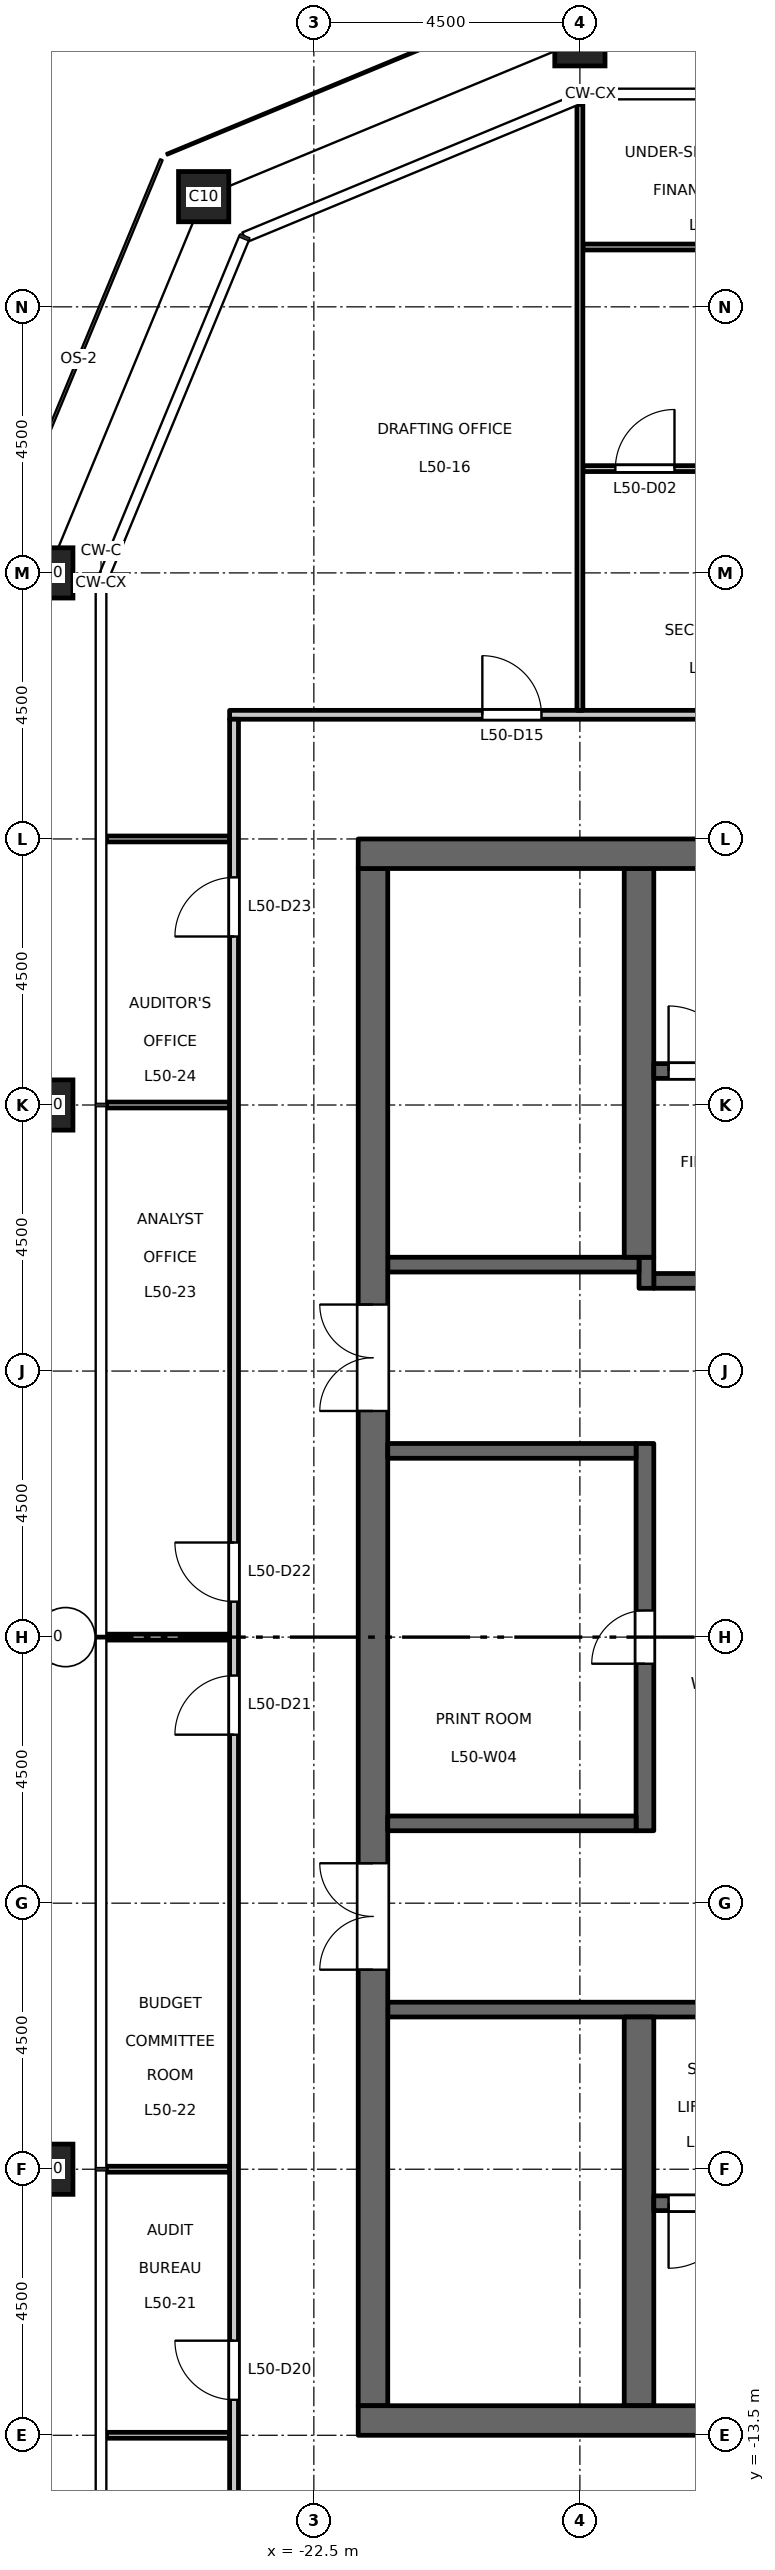
"""IFC4 building model, lengths in metres.
Left out: names, types, materials, properties, quantities, classifications, styles, units other than length and angle.
Written with IfcOpenShell. Run it as: python <this file> out.ifc"""

import sys

from ifc_helpers import new_model, si_unit, direction, frame, frame_2d, origin, origin_2d, place, context, subcontext, project, spatial, rectangle, hollow_rectangle, extrude, element, fill, save


model = new_model("IFC4")
c1 = context("Model", 3, precision=1e-05, world=origin(), true_north=direction((0.0, 1.0)))
c2 = subcontext(c1, "Body", "Model", "MODEL_VIEW")
j1 = project(units=[si_unit("LENGTHUNIT", "METRE"), si_unit("PLANEANGLEUNIT", "RADIAN")], contexts=[c1])
p1 = place(None, origin())
s1 = spatial("IfcSite", under=j1, at=p1, CompositionType="ELEMENT")
p2 = place(p1, origin())
s2 = spatial("IfcBuilding", under=s1, at=p2, CompositionType="ELEMENT")
p3 = place(p2, frame((0.0, 0.0, 233.2)))
s3 = spatial("IfcBuildingStorey", under=s2, at=p3, CompositionType="ELEMENT", Elevation=233.2)
for number, where, z_axis, x_axis in (
    (1, (-18.0, 27.0, 0.0), (0.0, 0.0, 1.0), (1.0, 0.0, 0.0)),
    (2, (-24.364, 24.364, 0.0), (0.0, 0.0, 1.0), (1.0, 0.0, 0.0)),
    (3, (-27.0, 18.0, 0.0), (0.0, 0.0, 1.0), (1.0, 0.0, 0.0)),
    (4, (-27.0, 9.0, 0.0), (0.0, 0.0, 1.0), (1.0, 0.0, 0.0)),
    (5, (-27.0, 0.0, 0.0), (0.0, 0.0, 1.0), (1.0, 0.0, 0.0)),
    (6, (-27.0, -9.0, 0.0), (0.0, 0.0, 1.0), (1.0, 0.0, 0.0)),
):
    element("IfcColumn", number, at=place(p3, frame(where, z_axis=z_axis, x_axis=x_axis)), inside=s3, PredefinedType="COLUMN", context=c2, shape_type="SweptSolid", body=[
        extrude(hollow_rectangle(XDim=0.85, YDim=0.85, WallThickness=0.05, at=origin_2d()), origin(), (0.0, 0.0, 1.0), 4.5),
    ])
p4 = place(p3, frame((-12.15, 6.025, 0.0), z_axis=(0.0, 0.0, 1.0), x_axis=(-1.0, 0.0, 0.0)))
e7 = element("IfcWall", 7, at=p4, inside=s3, PredefinedType="SHEAR", context=c2, shape_type="SweptSolid", body=[
    extrude(rectangle(XDim=4.6, YDim=0.25, at=frame_2d((2.3, 0.0))), origin(), (0.0, 0.0, 1.0), 4.35),
])
p5 = place(p4, frame((1.8, 0.0, 0.0)))
e8 = element("IfcOpeningElement", 8, at=p5, cuts=e7, PredefinedType="OPENING", context=c2, shape_type="SweptSolid", body=[
    extrude(rectangle(XDim=1.0, YDim=2.1, at=frame_2d((0.5, 1.05))), frame((0.0, 0.135, 0.0), z_axis=(0.0, -1.0, 0.0), x_axis=(1.0, 0.0, 0.0)), (0.0, 0.0, 1.0), 0.27),
])
p6 = place(p3, frame((-16.875, 5.9, 0.0), z_axis=(0.0, 0.0, 1.0), x_axis=(0.0, 1.0, 0.0)))
e9 = element("IfcWall", 9, at=p6, inside=s3, PredefinedType="SHEAR", context=c2, shape_type="SweptSolid", body=[
    extrude(rectangle(XDim=0.525, YDim=0.25, at=frame_2d((0.263, 0.0))), origin(), (0.0, 0.0, 1.0), 4.35),
])
p7 = place(p3, frame((-17.0, 6.3, 0.0), z_axis=(0.0, 0.0, 1.0), x_axis=(-1.0, 0.0, 0.0)))
e10 = element("IfcWall", 10, at=p7, inside=s3, PredefinedType="SHEAR", context=c2, shape_type="SweptSolid", body=[
    extrude(rectangle(XDim=4.25, YDim=0.25, at=frame_2d((2.125, 0.0))), origin(), (0.0, 0.0, 1.0), 4.35),
])
p8 = place(p3, frame((-12.15, -6.3, 0.0), z_axis=(0.0, 0.0, 1.0), x_axis=(-1.0, 0.0, 0.0)))
e11 = element("IfcWall", 11, at=p8, inside=s3, PredefinedType="SHEAR", context=c2, shape_type="SweptSolid", body=[
    extrude(rectangle(XDim=9.1, YDim=0.25, at=frame_2d((4.55, 0.0))), origin(), (0.0, 0.0, 1.0), 4.35),
])
p9 = place(p8, frame((1.8, 0.0, 0.0)))
e12 = element("IfcOpeningElement", 12, at=p9, cuts=e11, PredefinedType="OPENING", context=c2, shape_type="SweptSolid", body=[
    extrude(rectangle(XDim=1.0, YDim=2.1, at=frame_2d((0.5, 1.05))), frame((0.0, 0.135, 0.0), z_axis=(0.0, -1.0, 0.0), x_axis=(1.0, 0.0, 0.0)), (0.0, 0.0, 1.0), 0.27),
])
p10 = place(p3, frame((-21.5, -13.0, 0.0), z_axis=(0.0, 0.0, 1.0), x_axis=(0.0, 1.0, 0.0)))
e13 = element("IfcWall", 13, at=p10, inside=s3, PredefinedType="SHEAR", context=c2, shape_type="SweptSolid", body=[
    extrude(rectangle(XDim=26.0, YDim=0.5, at=frame_2d((13.0, 0.0))), origin(), (0.0, 0.0, 1.0), 4.35),
])
p11 = place(p10, frame((16.825, 0.0, 0.0)))
e14 = element("IfcOpeningElement", 14, at=p11, cuts=e13, PredefinedType="OPENING", context=c2, shape_type="SweptSolid", body=[
    extrude(rectangle(XDim=1.8, YDim=2.1, at=frame_2d((0.9, 1.05))), frame((0.0, 0.26, 0.0), z_axis=(0.0, -1.0, 0.0), x_axis=(1.0, 0.0, 0.0)), (0.0, 0.0, 1.0), 0.52),
])
p12 = place(p10, frame((7.375, 0.0, 0.0)))
e15 = element("IfcOpeningElement", 15, at=p12, cuts=e13, PredefinedType="OPENING", context=c2, shape_type="SweptSolid", body=[
    extrude(rectangle(XDim=1.8, YDim=2.1, at=frame_2d((0.9, 1.05))), frame((0.0, 0.26, 0.0), z_axis=(0.0, -1.0, 0.0), x_axis=(1.0, 0.0, 0.0)), (0.0, 0.0, 1.0), 0.52),
])
p13 = place(p3, frame((-16.9, -3.275, 0.0), z_axis=(0.0, 0.0, 1.0), x_axis=(0.0, 1.0, 0.0)))
e16 = element("IfcWall", 16, at=p13, inside=s3, PredefinedType="SHEAR", context=c2, shape_type="SweptSolid", body=[
    extrude(rectangle(XDim=6.55, YDim=0.3, at=frame_2d((3.275, 0.0))), origin(), (0.0, 0.0, 1.0), 4.35),
])
p14 = place(p13, frame((2.825, 0.0, 0.0)))
e17 = element("IfcOpeningElement", 17, at=p14, cuts=e16, PredefinedType="OPENING", context=c2, shape_type="SweptSolid", body=[
    extrude(rectangle(XDim=0.9, YDim=2.1, at=frame_2d((0.45, 1.05))), frame((0.0, 0.16, 0.0), z_axis=(0.0, -1.0, 0.0), x_axis=(1.0, 0.0, 0.0)), (0.0, 0.0, 1.0), 0.32),
])
for number, where, z_axis, x_axis in (
    (18, (-17.05, 3.15, 0.0), (0.0, 0.0, 1.0), (-1.0, 0.0, 0.0)),
    (19, (-17.05, -3.15, 0.0), (0.0, 0.0, 1.0), (-1.0, 0.0, 0.0)),
):
    element("IfcWall", number, at=place(p3, frame(where, z_axis=z_axis, x_axis=x_axis)), inside=s3, PredefinedType="SHEAR", context=c2, shape_type="SweptSolid", body=[
        extrude(rectangle(XDim=4.2, YDim=0.25, at=frame_2d((2.1, 0.0))), origin(), (0.0, 0.0, 1.0), 4.35),
    ])
for number, where, z_axis, x_axis in (
    (20, (-17.0, 6.425, 0.0), (0.0, 0.0, 1.0), (0.0, 1.0, 0.0)),
    (21, (-17.0, -13.0, 0.0), (0.0, 0.0, 1.0), (0.0, 1.0, 0.0)),
):
    element("IfcWall", number, at=place(p3, frame(where, z_axis=z_axis, x_axis=x_axis)), inside=s3, PredefinedType="SHEAR", context=c2, shape_type="SweptSolid", body=[
        extrude(rectangle(XDim=6.575, YDim=0.5, at=frame_2d((3.288, 0.0))), origin(), (0.0, 0.0, 1.0), 4.35),
    ])
p15 = place(p3, frame((-8.75, 9.575, 0.0), z_axis=(0.0, 0.0, 1.0), x_axis=(-1.0, 0.0, 0.0)))
e22 = element("IfcWall", 22, at=p15, inside=s3, PredefinedType="SHEAR", context=c2, shape_type="SweptSolid", body=[
    extrude(rectangle(XDim=8.0, YDim=0.25, at=frame_2d((4.0, 0.0))), origin(), (0.0, 0.0, 1.0), 4.35),
])
p16 = place(p15, frame((6.65, 0.0, 0.0)))
e23 = element("IfcOpeningElement", 23, at=p16, cuts=e22, PredefinedType="OPENING", context=c2, shape_type="SweptSolid", body=[
    extrude(rectangle(XDim=1.1, YDim=2.1, at=frame_2d((0.55, 1.05))), frame((0.0, 0.135, 0.0), z_axis=(0.0, -1.0, 0.0), x_axis=(1.0, 0.0, 0.0)), (0.0, 0.0, 1.0), 0.27),
])
p17 = place(p3, frame((-8.75, -9.575, 0.0), z_axis=(0.0, 0.0, 1.0), x_axis=(-1.0, 0.0, 0.0)))
e24 = element("IfcWall", 24, at=p17, inside=s3, PredefinedType="SHEAR", context=c2, shape_type="SweptSolid", body=[
    extrude(rectangle(XDim=8.0, YDim=0.25, at=frame_2d((4.0, 0.0))), origin(), (0.0, 0.0, 1.0), 4.35),
])
p18 = place(p17, frame((6.65, 0.0, 0.0)))
e25 = element("IfcOpeningElement", 25, at=p18, cuts=e24, PredefinedType="OPENING", context=c2, shape_type="SweptSolid", body=[
    extrude(rectangle(XDim=1.1, YDim=2.1, at=frame_2d((0.55, 1.05))), frame((0.0, 0.135, 0.0), z_axis=(0.0, -1.0, 0.0), x_axis=(1.0, 0.0, 0.0)), (0.0, 0.0, 1.0), 0.27),
])
for number, where, z_axis, x_axis in (
    (26, (-8.25, 13.25, 0.0), (0.0, 0.0, 1.0), (-1.0, 0.0, 0.0)),
    (27, (-8.25, -13.25, 0.0), (0.0, 0.0, 1.0), (-1.0, 0.0, 0.0)),
):
    element("IfcWall", number, at=place(p3, frame(where, z_axis=z_axis, x_axis=x_axis)), inside=s3, PredefinedType="SHEAR", context=c2, shape_type="SweptSolid", body=[
        extrude(rectangle(XDim=13.5, YDim=0.5, at=frame_2d((6.75, 0.0))), origin(), (0.0, 0.0, 1.0), 4.35),
    ])
p19 = place(p3, frame((-26.01, -13.5, 0.0), z_axis=(0.0, 0.0, 1.0), x_axis=(1.0, 0.0, 0.0)))
e28 = element("IfcWall", 28, at=p19, inside=s3, PredefinedType="PARTITIONING", context=c2, shape_type="SweptSolid", body=[
    extrude(rectangle(XDim=2.085, YDim=0.1, at=frame_2d((1.042, 0.0))), origin(), (0.0, 0.0, 1.0), 3.95),
])
for number, where, z_axis, x_axis in (
    (29, (-26.01, -9.0, 0.0), (0.0, 0.0, 1.0), (1.0, 0.0, 0.0)),
    (30, (-26.01, 0.0, 0.0), (0.0, 0.0, 1.0), (1.0, 0.0, 0.0)),
    (31, (-26.01, 9.0, 0.0), (0.0, 0.0, 1.0), (1.0, 0.0, 0.0)),
    (32, (-26.01, 13.5, 0.0), (0.0, 0.0, 1.0), (1.0, 0.0, 0.0)),
):
    element("IfcWall", number, at=place(p3, frame(where, z_axis=z_axis, x_axis=x_axis)), inside=s3, PredefinedType="PARTITIONING", context=c2, shape_type="SweptSolid", body=[
        extrude(rectangle(XDim=2.085, YDim=0.1, at=frame_2d((1.042, 0.0))), origin(), (0.0, 0.0, 1.0), 4.35),
    ])
p20 = place(p3, frame((-23.925, 15.6, 0.0), z_axis=(0.0, 0.0, 1.0), x_axis=(1.0, 0.0, 0.0)))
e33 = element("IfcWall", 33, at=p20, inside=s3, PredefinedType="PARTITIONING", context=c2, shape_type="SweptSolid", body=[
    extrude(rectangle(XDim=47.85, YDim=0.15, at=frame_2d((23.925, 0.0))), origin(), (0.0, 0.0, 1.0), 4.35),
])
p21 = place(p20, frame((13.275, 0.0, 0.0)))
e34 = element("IfcOpeningElement", 34, at=p21, cuts=e33, PredefinedType="OPENING", context=c2, shape_type="SweptSolid", body=[
    extrude(rectangle(XDim=1.0, YDim=2.1, at=frame_2d((0.5, 1.05))), frame((0.0, 0.085, 0.0), z_axis=(0.0, -1.0, 0.0), x_axis=(1.0, 0.0, 0.0)), (0.0, 0.0, 1.0), 0.17),
])
p22 = place(p20, frame((15.525, 0.0, 0.0)))
e35 = element("IfcOpeningElement", 35, at=p22, cuts=e33, PredefinedType="OPENING", context=c2, shape_type="SweptSolid", body=[
    extrude(rectangle(XDim=1.0, YDim=2.1, at=frame_2d((0.5, 1.05))), frame((0.0, 0.085, 0.0), z_axis=(0.0, -1.0, 0.0), x_axis=(1.0, 0.0, 0.0)), (0.0, 0.0, 1.0), 0.17),
])
p23 = place(p20, frame((31.275, 0.0, 0.0)))
e36 = element("IfcOpeningElement", 36, at=p23, cuts=e33, PredefinedType="OPENING", context=c2, shape_type="SweptSolid", body=[
    extrude(rectangle(XDim=1.0, YDim=2.1, at=frame_2d((0.5, 1.05))), frame((0.0, 0.085, 0.0), z_axis=(0.0, -1.0, 0.0), x_axis=(1.0, 0.0, 0.0)), (0.0, 0.0, 1.0), 0.17),
])
p24 = place(p20, frame((33.525, 0.0, 0.0)))
e37 = element("IfcOpeningElement", 37, at=p24, cuts=e33, PredefinedType="OPENING", context=c2, shape_type="SweptSolid", body=[
    extrude(rectangle(XDim=1.0, YDim=2.1, at=frame_2d((0.5, 1.05))), frame((0.0, 0.085, 0.0), z_axis=(0.0, -1.0, 0.0), x_axis=(1.0, 0.0, 0.0)), (0.0, 0.0, 1.0), 0.17),
])
p25 = place(p20, frame((4.275, 0.0, 0.0)))
e38 = element("IfcOpeningElement", 38, at=p25, cuts=e33, PredefinedType="OPENING", context=c2, shape_type="SweptSolid", body=[
    extrude(rectangle(XDim=1.0, YDim=2.1, at=frame_2d((0.5, 1.05))), frame((0.0, 0.085, 0.0), z_axis=(0.0, -1.0, 0.0), x_axis=(1.0, 0.0, 0.0)), (0.0, 0.0, 1.0), 0.17),
])
p26 = place(p20, frame((42.625, 0.0, 0.0)))
e39 = element("IfcOpeningElement", 39, at=p26, cuts=e33, PredefinedType="OPENING", context=c2, shape_type="SweptSolid", body=[
    extrude(rectangle(XDim=1.0, YDim=2.1, at=frame_2d((0.5, 1.05))), frame((0.0, 0.085, 0.0), z_axis=(0.0, -1.0, 0.0), x_axis=(1.0, 0.0, 0.0)), (0.0, 0.0, 1.0), 0.17),
])
p27 = place(p3, frame((-17.95, 19.764, 0.0), z_axis=(0.0, 0.0, 1.0), x_axis=(1.0, 0.0, 0.0)))
e40 = element("IfcWall", 40, at=p27, inside=s3, PredefinedType="PARTITIONING", context=c2, shape_type="SweptSolid", body=[
    extrude(rectangle(XDim=8.9, YDim=0.1, at=frame_2d((4.45, 0.0))), origin(), (0.0, 0.0, 1.0), 4.35),
])
p28 = place(p27, frame((0.55, 0.0, 0.0)))
e41 = element("IfcOpeningElement", 41, at=p28, cuts=e40, PredefinedType="OPENING", context=c2, shape_type="SweptSolid", body=[
    extrude(rectangle(XDim=1.0, YDim=2.1, at=frame_2d((0.5, 1.05))), frame((0.0, 0.06, 0.0), z_axis=(0.0, -1.0, 0.0), x_axis=(1.0, 0.0, 0.0)), (0.0, 0.0, 1.0), 0.12),
])
p29 = place(p3, frame((-17.95, 23.512, 0.0), z_axis=(0.0, 0.0, 1.0), x_axis=(1.0, 0.0, 0.0)))
e42 = element("IfcWall", 42, at=p29, inside=s3, PredefinedType="PARTITIONING", context=c2, shape_type="SweptSolid", body=[
    extrude(rectangle(XDim=8.9, YDim=0.1, at=frame_2d((4.45, 0.0))), origin(), (0.0, 0.0, 1.0), 4.35),
])
p30 = place(p29, frame((7.3, 0.0, 0.0)))
e43 = element("IfcOpeningElement", 43, at=p30, cuts=e42, PredefinedType="OPENING", context=c2, shape_type="SweptSolid", body=[
    extrude(rectangle(XDim=1.0, YDim=2.1, at=frame_2d((0.5, 1.05))), frame((0.0, 0.06, 0.0), z_axis=(0.0, -1.0, 0.0), x_axis=(1.0, 0.0, 0.0)), (0.0, 0.0, 1.0), 0.12),
])
p31 = place(p3, frame((-23.85, -15.525, 0.0), z_axis=(0.0, 0.0, 1.0), x_axis=(0.0, 1.0, 0.0)))
e44 = element("IfcWall", 44, at=p31, inside=s3, PredefinedType="PARTITIONING", context=c2, shape_type="SweptSolid", body=[
    extrude(rectangle(XDim=31.05, YDim=0.15, at=frame_2d((15.525, 0.0))), origin(), (0.0, 0.0, 1.0), 4.35),
])
p32 = place(p31, frame((2.625, 0.0, 0.0)))
e45 = element("IfcOpeningElement", 45, at=p32, cuts=e44, PredefinedType="OPENING", context=c2, shape_type="SweptSolid", body=[
    extrude(rectangle(XDim=1.0, YDim=2.1, at=frame_2d((0.5, 1.05))), frame((0.0, 0.085, 0.0), z_axis=(0.0, -1.0, 0.0), x_axis=(1.0, 0.0, 0.0)), (0.0, 0.0, 1.0), 0.17),
])
p33 = place(p31, frame((13.875, 0.0, 0.0)))
e46 = element("IfcOpeningElement", 46, at=p33, cuts=e44, PredefinedType="OPENING", context=c2, shape_type="SweptSolid", body=[
    extrude(rectangle(XDim=1.0, YDim=2.1, at=frame_2d((0.5, 1.05))), frame((0.0, 0.085, 0.0), z_axis=(0.0, -1.0, 0.0), x_axis=(1.0, 0.0, 0.0)), (0.0, 0.0, 1.0), 0.17),
])
p34 = place(p31, frame((16.125, 0.0, 0.0)))
e47 = element("IfcOpeningElement", 47, at=p34, cuts=e44, PredefinedType="OPENING", context=c2, shape_type="SweptSolid", body=[
    extrude(rectangle(XDim=1.0, YDim=2.1, at=frame_2d((0.5, 1.05))), frame((0.0, 0.085, 0.0), z_axis=(0.0, -1.0, 0.0), x_axis=(1.0, 0.0, 0.0)), (0.0, 0.0, 1.0), 0.17),
])
p35 = place(p31, frame((27.375, 0.0, 0.0)))
e48 = element("IfcOpeningElement", 48, at=p35, cuts=e44, PredefinedType="OPENING", context=c2, shape_type="SweptSolid", body=[
    extrude(rectangle(XDim=1.0, YDim=2.1, at=frame_2d((0.5, 1.05))), frame((0.0, 0.085, 0.0), z_axis=(0.0, -1.0, 0.0), x_axis=(1.0, 0.0, 0.0)), (0.0, 0.0, 1.0), 0.17),
])
p36 = place(p3, frame((-18.0, 15.675, 0.0), z_axis=(0.0, 0.0, 1.0), x_axis=(0.0, 1.0, 0.0)))
e49 = element("IfcWall", 49, at=p36, inside=s3, PredefinedType="PARTITIONING", context=c2, shape_type="SweptSolid", body=[
    extrude(rectangle(XDim=10.253, YDim=0.1, at=frame_2d((5.126, 0.0))), origin(), (0.0, 0.0, 1.0), 3.65),
])
p37 = place(p16, origin())
e50 = element("IfcDoor", 50, at=p37, inside=s3, OperationType="SINGLE_SWING_RIGHT", PredefinedType="DOOR", context=c2, shape_type="SweptSolid", body=[
    extrude(rectangle(XDim=1.1, YDim=2.1, at=frame_2d((0.55, 1.05))), frame((0.0, 0.025, 0.0), z_axis=(0.0, -1.0, 0.0), x_axis=(1.0, 0.0, 0.0)), (0.0, 0.0, 1.0), 0.05),
])
fill(e23, e50)
p38 = place(p18, origin())
e51 = element("IfcDoor", 51, at=p38, inside=s3, OperationType="SINGLE_SWING_LEFT", PredefinedType="DOOR", context=c2, shape_type="SweptSolid", body=[
    extrude(rectangle(XDim=1.1, YDim=2.1, at=frame_2d((0.55, 1.05))), frame((0.0, 0.025, 0.0), z_axis=(0.0, -1.0, 0.0), x_axis=(1.0, 0.0, 0.0)), (0.0, 0.0, 1.0), 0.05),
])
fill(e25, e51)
p39 = place(p11, origin())
e52 = element("IfcDoor", 52, at=p39, inside=s3, OperationType="DOUBLE_DOOR_DOUBLE_SWING", PredefinedType="DOOR", context=c2, shape_type="SweptSolid", body=[
    extrude(rectangle(XDim=1.8, YDim=2.1, at=frame_2d((0.9, 1.05))), frame((0.0, 0.025, 0.0), z_axis=(0.0, -1.0, 0.0), x_axis=(1.0, 0.0, 0.0)), (0.0, 0.0, 1.0), 0.05),
])
fill(e14, e52)
p40 = place(p12, origin())
e53 = element("IfcDoor", 53, at=p40, inside=s3, OperationType="DOUBLE_DOOR_DOUBLE_SWING", PredefinedType="DOOR", context=c2, shape_type="SweptSolid", body=[
    extrude(rectangle(XDim=1.8, YDim=2.1, at=frame_2d((0.9, 1.05))), frame((0.0, 0.025, 0.0), z_axis=(0.0, -1.0, 0.0), x_axis=(1.0, 0.0, 0.0)), (0.0, 0.0, 1.0), 0.05),
])
fill(e15, e53)
p41 = place(p14, origin())
e54 = element("IfcDoor", 54, at=p41, inside=s3, OperationType="SINGLE_SWING_RIGHT", PredefinedType="DOOR", context=c2, shape_type="SweptSolid", body=[
    extrude(rectangle(XDim=0.9, YDim=2.1, at=frame_2d((0.45, 1.05))), frame((0.0, 0.025, 0.0), z_axis=(0.0, -1.0, 0.0), x_axis=(1.0, 0.0, 0.0)), (0.0, 0.0, 1.0), 0.05),
])
fill(e17, e54)
p42 = place(p28, origin())
e55 = element("IfcDoor", 55, at=p42, inside=s3, OperationType="SINGLE_SWING_RIGHT", PredefinedType="DOOR", context=c2, shape_type="SweptSolid", body=[
    extrude(rectangle(XDim=1.0, YDim=2.1, at=frame_2d((0.5, 1.05))), frame((0.0, 0.025, 0.0), z_axis=(0.0, -1.0, 0.0), x_axis=(1.0, 0.0, 0.0)), (0.0, 0.0, 1.0), 0.05),
])
fill(e41, e55)
p43 = place(p25, origin())
e56 = element("IfcDoor", 56, at=p43, inside=s3, OperationType="SINGLE_SWING_LEFT", PredefinedType="DOOR", context=c2, shape_type="SweptSolid", body=[
    extrude(rectangle(XDim=1.0, YDim=2.1, at=frame_2d((0.5, 1.05))), frame((0.0, 0.025, 0.0), z_axis=(0.0, -1.0, 0.0), x_axis=(1.0, 0.0, 0.0)), (0.0, 0.0, 1.0), 0.05),
])
fill(e38, e56)
p44 = place(p32, origin())
e57 = element("IfcDoor", 57, at=p44, inside=s3, OperationType="SINGLE_SWING_RIGHT", PredefinedType="DOOR", context=c2, shape_type="SweptSolid", body=[
    extrude(rectangle(XDim=1.0, YDim=2.1, at=frame_2d((0.5, 1.05))), frame((0.0, 0.025, 0.0), z_axis=(0.0, -1.0, 0.0), x_axis=(1.0, 0.0, 0.0)), (0.0, 0.0, 1.0), 0.05),
])
fill(e45, e57)
p45 = place(p33, origin())
e58 = element("IfcDoor", 58, at=p45, inside=s3, OperationType="SINGLE_SWING_LEFT", PredefinedType="DOOR", context=c2, shape_type="SweptSolid", body=[
    extrude(rectangle(XDim=1.0, YDim=2.1, at=frame_2d((0.5, 1.05))), frame((0.0, 0.025, 0.0), z_axis=(0.0, -1.0, 0.0), x_axis=(1.0, 0.0, 0.0)), (0.0, 0.0, 1.0), 0.05),
])
fill(e46, e58)
p46 = place(p34, origin())
e59 = element("IfcDoor", 59, at=p46, inside=s3, OperationType="SINGLE_SWING_RIGHT", PredefinedType="DOOR", context=c2, shape_type="SweptSolid", body=[
    extrude(rectangle(XDim=1.0, YDim=2.1, at=frame_2d((0.5, 1.05))), frame((0.0, 0.025, 0.0), z_axis=(0.0, -1.0, 0.0), x_axis=(1.0, 0.0, 0.0)), (0.0, 0.0, 1.0), 0.05),
])
fill(e47, e59)
p47 = place(p35, origin())
e60 = element("IfcDoor", 60, at=p47, inside=s3, OperationType="SINGLE_SWING_LEFT", PredefinedType="DOOR", context=c2, shape_type="SweptSolid", body=[
    extrude(rectangle(XDim=1.0, YDim=2.1, at=frame_2d((0.5, 1.05))), frame((0.0, 0.025, 0.0), z_axis=(0.0, -1.0, 0.0), x_axis=(1.0, 0.0, 0.0)), (0.0, 0.0, 1.0), 0.05),
])
fill(e48, e60)
save(model, sys.argv[1])
